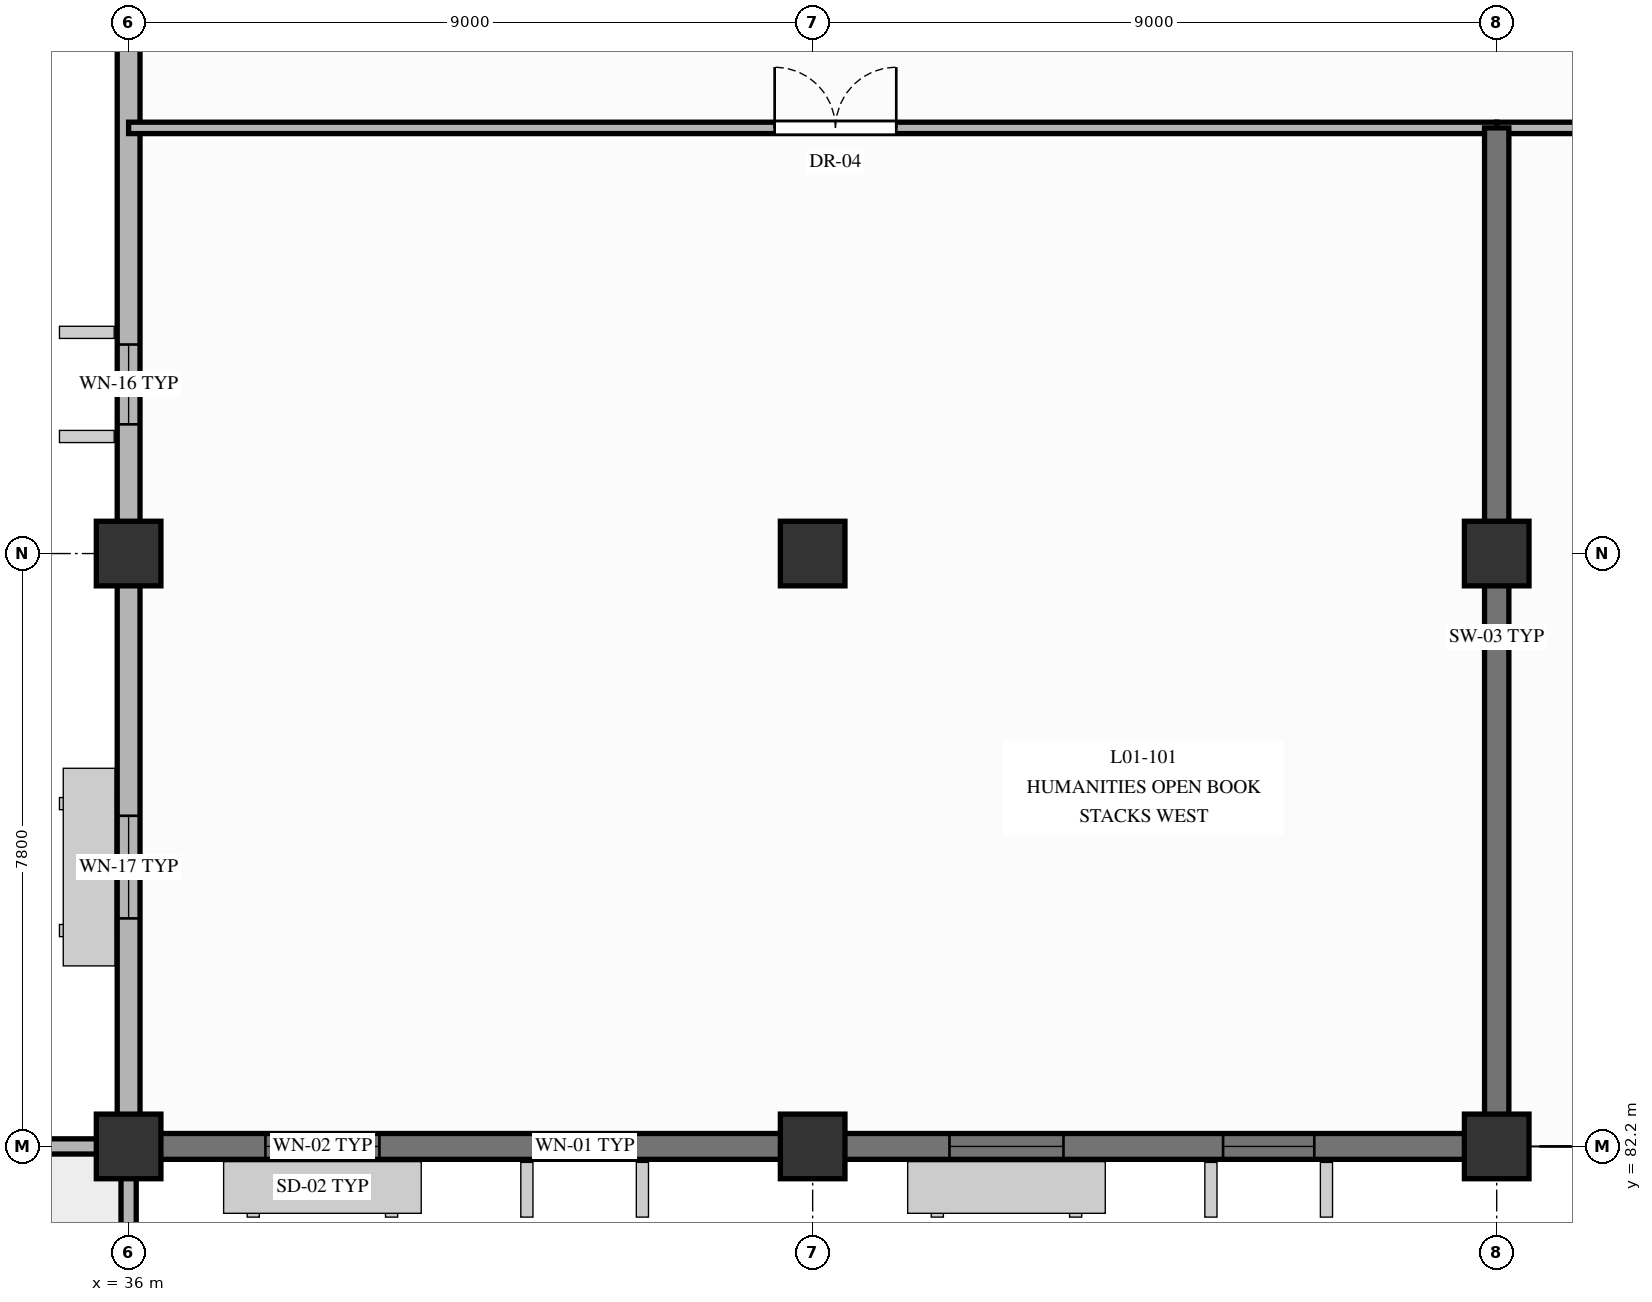
"""IFC4 building model, lengths in metres.
Left out: names, types, materials, properties, quantities, classifications, styles, units other than length and angle.
Written with IfcOpenShell. Run it as: python <this file> out.ifc"""

import sys

from ifc_helpers import new_model, si_unit, direction, frame, frame_2d, origin, origin_2d, place, context, subcontext, project, spatial, rectangle, extrude, element, fill, save


model = new_model("IFC4")
c1 = context("Model", 3, precision=1e-05, world=origin(), true_north=direction((0.0, 1.0)))
c2 = subcontext(c1, "Body", "Model", "MODEL_VIEW")
j1 = project(units=[si_unit("LENGTHUNIT", "METRE"), si_unit("PLANEANGLEUNIT", "RADIAN")], contexts=[c1])
p1 = place(None, origin())
s1 = spatial("IfcSite", under=j1, at=p1, CompositionType="ELEMENT")
p2 = place(p1, origin())
s2 = spatial("IfcBuilding", under=s1, at=p2, CompositionType="ELEMENT")
p3 = place(p2, frame((0.0, 0.0, 5.1)))
s3 = spatial("IfcBuildingStorey", under=s2, at=p3, CompositionType="ELEMENT", Elevation=5.1)
for number, where, z_axis, x_axis in (
    (1, (36.0, 82.2, 0.0), (0.0, 0.0, 1.0), (1.0, 0.0, 0.0)),
    (2, (36.0, 90.0, 0.0), (0.0, 0.0, 1.0), (1.0, 0.0, 0.0)),
    (3, (45.0, 82.2, 0.0), (0.0, 0.0, 1.0), (1.0, 0.0, 0.0)),
    (4, (45.0, 90.0, 0.0), (0.0, 0.0, 1.0), (1.0, 0.0, 0.0)),
    (5, (54.0, 82.2, 0.0), (0.0, 0.0, 1.0), (1.0, 0.0, 0.0)),
    (6, (54.0, 90.0, 0.0), (0.0, 0.0, 1.0), (1.0, 0.0, 0.0)),
):
    element("IfcColumn", number, at=place(p3, frame(where, z_axis=z_axis, x_axis=x_axis)), inside=s3, PredefinedType="COLUMN", context=c2, shape_type="SweptSolid", body=[
        extrude(rectangle(XDim=0.85, YDim=0.85, at=origin_2d()), origin(), (0.0, 0.0, 1.0), 3.84),
    ])
p4 = place(p3, frame((36.0, 82.2, 0.0), z_axis=(0.0, 0.0, 1.0), x_axis=(1.0, 0.0, 0.0)))
e7 = element("IfcWall", 7, at=p4, inside=s3, PredefinedType="SOLIDWALL", context=c2, shape_type="SweptSolid", body=[
    extrude(rectangle(XDim=9.0, YDim=0.34, at=frame_2d((4.5, 0.0))), origin(), (0.0, 0.0, 1.0), 3.55),
])
p5 = place(p4, frame((1.8, 0.0, 0.715)))
e8 = element("IfcOpeningElement", 8, at=p5, cuts=e7, PredefinedType="OPENING", context=c2, shape_type="SweptSolid", body=[
    extrude(rectangle(XDim=1.5, YDim=2.1, at=frame_2d((0.75, 1.05))), frame((0.0, 0.18, 0.0), z_axis=(0.0, -1.0, 0.0), x_axis=(1.0, 0.0, 0.0)), (0.0, 0.0, 1.0), 0.36),
])
p6 = place(p4, frame((5.4, 0.0, 0.715)))
e9 = element("IfcOpeningElement", 9, at=p6, cuts=e7, PredefinedType="OPENING", context=c2, shape_type="SweptSolid", body=[
    extrude(rectangle(XDim=1.2, YDim=2.1, at=frame_2d((0.6, 1.05))), frame((0.0, 0.18, 0.0), z_axis=(0.0, -1.0, 0.0), x_axis=(1.0, 0.0, 0.0)), (0.0, 0.0, 1.0), 0.36),
])
p7 = place(p3, frame((45.0, 82.2, 0.0), z_axis=(0.0, 0.0, 1.0), x_axis=(1.0, 0.0, 0.0)))
e10 = element("IfcWall", 10, at=p7, inside=s3, PredefinedType="SOLIDWALL", context=c2, shape_type="SweptSolid", body=[
    extrude(rectangle(XDim=9.0, YDim=0.34, at=frame_2d((4.5, 0.0))), origin(), (0.0, 0.0, 1.0), 3.55),
])
p8 = place(p7, frame((1.8, 0.0, 0.715)))
e11 = element("IfcOpeningElement", 11, at=p8, cuts=e10, PredefinedType="OPENING", context=c2, shape_type="SweptSolid", body=[
    extrude(rectangle(XDim=1.5, YDim=2.1, at=frame_2d((0.75, 1.05))), frame((0.0, 0.18, 0.0), z_axis=(0.0, -1.0, 0.0), x_axis=(1.0, 0.0, 0.0)), (0.0, 0.0, 1.0), 0.36),
])
p9 = place(p7, frame((5.4, 0.0, 0.715)))
e12 = element("IfcOpeningElement", 12, at=p9, cuts=e10, PredefinedType="OPENING", context=c2, shape_type="SweptSolid", body=[
    extrude(rectangle(XDim=1.2, YDim=2.1, at=frame_2d((0.6, 1.05))), frame((0.0, 0.18, 0.0), z_axis=(0.0, -1.0, 0.0), x_axis=(1.0, 0.0, 0.0)), (0.0, 0.0, 1.0), 0.36),
])
p10 = place(p3, frame((36.0, 82.2, 0.0), z_axis=(0.0, 0.0, 1.0), x_axis=(0.0, 1.0, 0.0)))
e13 = element("IfcWall", 13, at=p10, inside=s3, PredefinedType="SOLIDWALL", context=c2, shape_type="SweptSolid", body=[
    extrude(rectangle(XDim=31.8, YDim=0.3, at=frame_2d((15.9, 0.0))), origin(), (0.0, 0.0, 1.0), 2.855),
])
p11 = place(p10, frame((3.0, 0.0, 0.885)))
e14 = element("IfcOpeningElement", 14, at=p11, cuts=e13, PredefinedType="OPENING", context=c2, shape_type="SweptSolid", body=[
    extrude(rectangle(XDim=1.35, YDim=1.85, at=frame_2d((0.675, 0.925))), frame((0.0, 0.16, 0.0), z_axis=(0.0, -1.0, 0.0), x_axis=(1.0, 0.0, 0.0)), (0.0, 0.0, 1.0), 0.32),
])
p12 = place(p10, frame((9.5, 0.0, 0.95)))
e15 = element("IfcOpeningElement", 15, at=p12, cuts=e13, PredefinedType="OPENING", context=c2, shape_type="SweptSolid", body=[
    extrude(rectangle(XDim=1.05, YDim=1.75, at=frame_2d((0.525, 0.875))), frame((0.0, 0.16, 0.0), z_axis=(0.0, -1.0, 0.0), x_axis=(1.0, 0.0, 0.0)), (0.0, 0.0, 1.0), 0.32),
])
p13 = place(p10, frame((16.5, 0.0, 0.635)))
e16 = element("IfcOpeningElement", 16, at=p13, cuts=e13, PredefinedType="OPENING", context=c2, shape_type="SweptSolid", body=[
    extrude(rectangle(XDim=1.5, YDim=2.1, at=frame_2d((0.75, 1.05))), frame((0.0, 0.16, 0.0), z_axis=(0.0, -1.0, 0.0), x_axis=(1.0, 0.0, 0.0)), (0.0, 0.0, 1.0), 0.32),
])
p14 = place(p3, frame((36.0, 77.8, 0.0), z_axis=(0.0, 0.0, 1.0), x_axis=(0.0, 1.0, 0.0)))
e17 = element("IfcWall", 17, at=p14, inside=s3, PredefinedType="PARAPET", context=c2, shape_type="SweptSolid", body=[
    extrude(rectangle(XDim=4.2, YDim=0.2, at=frame_2d((2.1, 0.0))), origin(), (0.0, 0.0, 1.0), 0.72),
])
p15 = place(p3, frame((35.8, 82.2, 0.0), z_axis=(0.0, 0.0, 1.0), x_axis=(-1.0, 0.0, 0.0)))
e18 = element("IfcWall", 18, at=p15, inside=s3, PredefinedType="PARAPET", context=c2, shape_type="SweptSolid", body=[
    extrude(rectangle(XDim=35.6, YDim=0.2, at=frame_2d((17.8, 0.0))), origin(), (0.0, 0.0, 1.0), 0.72),
])
p16 = place(p3, frame((36.0, 95.6, 0.0), z_axis=(0.0, 0.0, 1.0), x_axis=(1.0, 0.0, 0.0)))
e19 = element("IfcWall", 19, at=p16, inside=s3, PredefinedType="PARTITIONING", context=c2, shape_type="SweptSolid", body=[
    extrude(rectangle(XDim=18.0, YDim=0.15, at=frame_2d((9.0, 0.0))), origin(), (0.0, 0.0, 1.0), 2.735),
])
p17 = place(p16, frame((8.5, 0.0, 0.0)))
e20 = element("IfcOpeningElement", 20, at=p17, cuts=e19, PredefinedType="OPENING", context=c2, shape_type="SweptSolid", body=[
    extrude(rectangle(XDim=1.6, YDim=2.2, at=frame_2d((0.8, 1.1))), frame((0.0, 0.085, 0.0), z_axis=(0.0, -1.0, 0.0), x_axis=(1.0, 0.0, 0.0)), (0.0, 0.0, 1.0), 0.17),
])
p18 = place(p3, frame((54.0, 95.6, 0.0), z_axis=(0.0, 0.0, 1.0), x_axis=(1.0, 0.0, 0.0)))
e21 = element("IfcWall", 21, at=p18, inside=s3, PredefinedType="PARTITIONING", context=c2, shape_type="SweptSolid", body=[
    extrude(rectangle(XDim=18.0, YDim=0.15, at=frame_2d((9.0, 0.0))), origin(), (0.0, 0.0, 1.0), 2.735),
])
p19 = place(p18, frame((8.5, 0.0, 0.0)))
e22 = element("IfcOpeningElement", 22, at=p19, cuts=e21, PredefinedType="OPENING", context=c2, shape_type="SweptSolid", body=[
    extrude(rectangle(XDim=1.6, YDim=2.2, at=frame_2d((0.8, 1.1))), frame((0.0, 0.085, 0.0), z_axis=(0.0, -1.0, 0.0), x_axis=(1.0, 0.0, 0.0)), (0.0, 0.0, 1.0), 0.17),
])
p20 = place(p3, frame((54.0, 82.2, 0.0), z_axis=(0.0, 0.0, 1.0), x_axis=(0.0, 1.0, 0.0)))
e23 = element("IfcWall", 23, at=p20, inside=s3, PredefinedType="SHEAR", context=c2, shape_type="SweptSolid", body=[
    extrude(rectangle(XDim=13.4, YDim=0.32, at=frame_2d((6.7, 0.0))), origin(), (0.0, 0.0, 1.0), 3.55),
])
p21 = place(p5, origin())
e24 = element("IfcWindow", 24, at=p21, inside=s3, PartitioningType="SINGLE_PANEL", PredefinedType="WINDOW", context=c2, shape_type="SweptSolid", body=[
    extrude(rectangle(XDim=1.5, YDim=2.1, at=frame_2d((0.75, 1.05))), frame((0.0, 0.03, 0.0), z_axis=(0.0, -1.0, 0.0), x_axis=(1.0, 0.0, 0.0)), (0.0, 0.0, 1.0), 0.06),
])
fill(e8, e24)
p22 = place(p6, origin())
e25 = element("IfcWindow", 25, at=p22, inside=s3, PartitioningType="SINGLE_PANEL", PredefinedType="WINDOW", context=c2, shape_type="SweptSolid", body=[
    extrude(rectangle(XDim=1.2, YDim=2.1, at=frame_2d((0.6, 1.05))), frame((0.0, 0.03, 0.0), z_axis=(0.0, -1.0, 0.0), x_axis=(1.0, 0.0, 0.0)), (0.0, 0.0, 1.0), 0.06),
])
fill(e9, e25)
p23 = place(p8, origin())
e26 = element("IfcWindow", 26, at=p23, inside=s3, PartitioningType="SINGLE_PANEL", PredefinedType="WINDOW", context=c2, shape_type="SweptSolid", body=[
    extrude(rectangle(XDim=1.5, YDim=2.1, at=frame_2d((0.75, 1.05))), frame((0.0, 0.03, 0.0), z_axis=(0.0, -1.0, 0.0), x_axis=(1.0, 0.0, 0.0)), (0.0, 0.0, 1.0), 0.06),
])
fill(e11, e26)
p24 = place(p9, origin())
e27 = element("IfcWindow", 27, at=p24, inside=s3, PartitioningType="SINGLE_PANEL", PredefinedType="WINDOW", context=c2, shape_type="SweptSolid", body=[
    extrude(rectangle(XDim=1.2, YDim=2.1, at=frame_2d((0.6, 1.05))), frame((0.0, 0.03, 0.0), z_axis=(0.0, -1.0, 0.0), x_axis=(1.0, 0.0, 0.0)), (0.0, 0.0, 1.0), 0.06),
])
fill(e12, e27)
p25 = place(p11, origin())
e28 = element("IfcWindow", 28, at=p25, inside=s3, PartitioningType="SINGLE_PANEL", PredefinedType="WINDOW", context=c2, shape_type="SweptSolid", body=[
    extrude(rectangle(XDim=1.35, YDim=1.85, at=frame_2d((0.675, 0.925))), frame((0.0, 0.03, 0.0), z_axis=(0.0, -1.0, 0.0), x_axis=(1.0, 0.0, 0.0)), (0.0, 0.0, 1.0), 0.06),
])
fill(e14, e28)
p26 = place(p12, origin())
e29 = element("IfcWindow", 29, at=p26, inside=s3, PartitioningType="SINGLE_PANEL", PredefinedType="WINDOW", context=c2, shape_type="SweptSolid", body=[
    extrude(rectangle(XDim=1.05, YDim=1.75, at=frame_2d((0.525, 0.875))), frame((0.0, 0.03, 0.0), z_axis=(0.0, -1.0, 0.0), x_axis=(1.0, 0.0, 0.0)), (0.0, 0.0, 1.0), 0.06),
])
fill(e15, e29)
p27 = place(p17, origin())
e30 = element("IfcDoor", 30, at=p27, inside=s3, OperationType="DOUBLE_DOOR_SINGLE_SWING", PredefinedType="DOOR", context=c2, shape_type="SweptSolid", body=[
    extrude(rectangle(XDim=1.6, YDim=2.2, at=frame_2d((0.8, 1.1))), frame((0.0, 0.025, 0.0), z_axis=(0.0, -1.0, 0.0), x_axis=(1.0, 0.0, 0.0)), (0.0, 0.0, 1.0), 0.05),
])
fill(e20, e30)
save(model, sys.argv[1])
